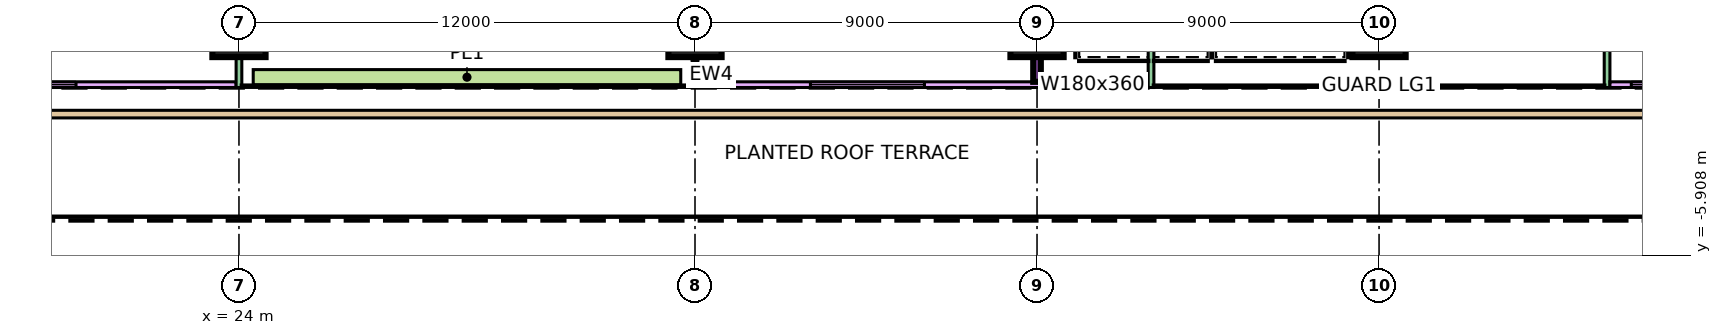
"""IFC4 building model, lengths in metres.
Left out: names, types, materials, properties, quantities, classifications, styles, units other than length and angle.
Written with IfcOpenShell. Run it as: python <this file> out.ifc"""

import sys

from ifc_helpers import new_model, si_unit, direction, frame, frame_2d, origin, origin_2d, place, context, subcontext, project, spatial, rectangle, extrude, element, fill, save


model = new_model("IFC4")
c1 = context("Model", 3, precision=1e-05, world=origin(), true_north=direction((0.0, 1.0)))
c2 = subcontext(c1, "Body", "Model", "MODEL_VIEW")
j1 = project(units=[si_unit("LENGTHUNIT", "METRE"), si_unit("PLANEANGLEUNIT", "RADIAN")], contexts=[c1])
p1 = place(None, origin())
s1 = spatial("IfcSite", under=j1, at=p1, CompositionType="ELEMENT")
p2 = place(p1, origin())
s2 = spatial("IfcBuilding", under=s1, at=p2, CompositionType="ELEMENT")
p3 = place(p2, frame((0.0, 0.0, 35.4)))
s3 = spatial("IfcBuildingStorey", under=s2, at=p3, CompositionType="ELEMENT", Elevation=35.4)
for number, where, z_axis, x_axis in (
    (1, (24.0, 0.0, 0.0), (0.0, 0.0, 1.0), (1.0, 0.0, 0.0)),
    (2, (36.0, 0.0, 0.0), (0.0, 0.0, 1.0), (1.0, 0.0, 0.0)),
    (3, (45.0, 0.0, 0.0), (0.0, 0.0, 1.0), (1.0, 0.0, 0.0)),
    (4, (54.0, 0.0, 0.0), (0.0, 0.0, 1.0), (1.0, 0.0, 0.0)),
):
    element("IfcColumn", number, at=place(p3, frame(where, z_axis=z_axis, x_axis=x_axis)), inside=s3, PredefinedType="COLUMN", context=c2, shape_type="SweptSolid", body=[
        extrude(rectangle(XDim=1.4, YDim=1.4, at=origin_2d()), origin(), (0.0, 0.0, 1.0), 6.0),
    ])
p4 = place(p3, frame((12.5, -1.425, 0.0), z_axis=(0.0, 0.0, 1.0), x_axis=(1.0, 0.0, 0.0)))
e5 = element("IfcWall", 5, at=p4, inside=s3, PredefinedType="SOLIDWALL", context=c2, shape_type="SweptSolid", body=[
    extrude(rectangle(XDim=11.425, YDim=0.15, at=frame_2d((5.712, 0.0))), origin(), (0.0, 0.0, 1.0), 5.6),
])
p5 = place(p4, frame((4.212, 0.0, 0.45)))
e6 = element("IfcOpeningElement", 6, at=p5, cuts=e5, PredefinedType="OPENING", context=c2, shape_type="SweptSolid", body=[
    extrude(rectangle(XDim=3.0, YDim=3.6, at=frame_2d((1.5, 1.8))), frame((0.0, 0.085, 0.0), z_axis=(0.0, -1.0, 0.0), x_axis=(1.0, 0.0, 0.0)), (0.0, 0.0, 1.0), 0.17),
])
for number, where, z_axis, x_axis in (
    (7, (24.0, -1.5, 0.0), (0.0, 0.0, 1.0), (0.0, 1.0, 0.0)),
    (8, (36.0, -1.5, 0.0), (0.0, 0.0, 1.0), (0.0, 1.0, 0.0)),
):
    element("IfcWall", number, at=place(p3, frame(where, z_axis=z_axis, x_axis=x_axis)), inside=s3, PredefinedType="SOLIDWALL", context=c2, shape_type="SweptSolid", body=[
        extrude(rectangle(XDim=1.5, YDim=0.15, at=frame_2d((0.75, 0.0))), origin(), (0.0, 0.0, 1.0), 5.6),
    ])
p6 = place(p3, frame((36.075, -1.425, 0.0), z_axis=(0.0, 0.0, 1.0), x_axis=(1.0, 0.0, 0.0)))
e9 = element("IfcWall", 9, at=p6, inside=s3, PredefinedType="SOLIDWALL", context=c2, shape_type="SweptSolid", body=[
    extrude(rectangle(XDim=11.85, YDim=0.15, at=frame_2d((5.925, 0.0))), origin(), (0.0, 0.0, 1.0), 5.6),
])
p7 = place(p6, frame((2.962, 0.0, 0.45)))
e10 = element("IfcOpeningElement", 10, at=p7, cuts=e9, PredefinedType="OPENING", context=c2, shape_type="SweptSolid", body=[
    extrude(rectangle(XDim=3.0, YDim=3.6, at=frame_2d((1.5, 1.8))), frame((0.0, 0.085, 0.0), z_axis=(0.0, -1.0, 0.0), x_axis=(1.0, 0.0, 0.0)), (0.0, 0.0, 1.0), 0.17),
])
p8 = place(p6, frame((9.488, 0.0, 0.45)))
e11 = element("IfcOpeningElement", 11, at=p8, cuts=e9, PredefinedType="OPENING", context=c2, shape_type="SweptSolid", body=[
    extrude(rectangle(XDim=1.8, YDim=3.6, at=frame_2d((0.9, 1.8))), frame((0.0, 0.085, 0.0), z_axis=(0.0, -1.0, 0.0), x_axis=(1.0, 0.0, 0.0)), (0.0, 0.0, 1.0), 0.17),
])
for number, where, z_axis, x_axis in (
    (12, (48.0, -1.5, 0.0), (0.0, 0.0, 1.0), (0.0, 1.0, 0.0)),
    (13, (60.0, -1.5, 0.0), (0.0, 0.0, 1.0), (0.0, 1.0, 0.0)),
):
    element("IfcWall", number, at=place(p3, frame(where, z_axis=z_axis, x_axis=x_axis)), inside=s3, PredefinedType="SOLIDWALL", context=c2, shape_type="SweptSolid", body=[
        extrude(rectangle(XDim=1.5, YDim=0.15, at=frame_2d((0.75, 0.0))), origin(), (0.0, 0.0, 1.0), 5.6),
    ])
p9 = place(p3, frame((60.075, -1.425, 0.0), z_axis=(0.0, 0.0, 1.0), x_axis=(1.0, 0.0, 0.0)))
e14 = element("IfcWall", 14, at=p9, inside=s3, PredefinedType="SOLIDWALL", context=c2, shape_type="SweptSolid", body=[
    extrude(rectangle(XDim=10.425, YDim=0.15, at=frame_2d((5.212, 0.0))), origin(), (0.0, 0.0, 1.0), 5.6),
])
p10 = place(p9, frame((0.562, 0.0, 0.45)))
e15 = element("IfcOpeningElement", 15, at=p10, cuts=e14, PredefinedType="OPENING", context=c2, shape_type="SweptSolid", body=[
    extrude(rectangle(XDim=1.8, YDim=3.6, at=frame_2d((0.9, 1.8))), frame((0.0, 0.085, 0.0), z_axis=(0.0, -1.0, 0.0), x_axis=(1.0, 0.0, 0.0)), (0.0, 0.0, 1.0), 0.17),
])
p11 = place(p9, frame((5.175, 0.0, 0.45)))
e16 = element("IfcOpeningElement", 16, at=p11, cuts=e14, PredefinedType="OPENING", context=c2, shape_type="SweptSolid", body=[
    extrude(rectangle(XDim=3.0, YDim=3.6, at=frame_2d((1.5, 1.8))), frame((0.0, 0.085, 0.0), z_axis=(0.0, -1.0, 0.0), x_axis=(1.0, 0.0, 0.0)), (0.0, 0.0, 1.0), 0.17),
])
p12 = place(p3, frame((24.375, -1.229, 0.0), z_axis=(0.0, 0.0, 1.0), x_axis=(1.0, 0.0, 0.0)))
e17 = element("IfcWall", 17, at=p12, inside=s3, PredefinedType="SOLIDWALL", context=c2, shape_type="SweptSolid", body=[
    extrude(rectangle(XDim=11.25, YDim=0.4, at=frame_2d((5.625, 0.0))), origin(), (0.0, 0.0, 1.0), 0.7),
])
p13 = place(p3, frame((70.79, -2.2, 0.0), z_axis=(0.0, 0.0, 1.0), x_axis=(-1.0, 0.0, 0.0)))
e18 = element("IfcWall", 18, at=p13, inside=s3, PredefinedType="PARAPET", context=c2, shape_type="SweptSolid", body=[
    extrude(rectangle(XDim=58.58, YDim=0.2, at=frame_2d((29.29, 0.0))), origin(), (0.0, 0.0, 1.0), 0.5),
])
p14 = place(p3, frame((45.0, -1.351, 0.0), z_axis=(0.0, 0.0, 1.0), x_axis=(0.0, 1.0, 0.0)))
e19 = element("IfcWall", 19, at=p14, inside=s3, PredefinedType="SOLIDWALL", context=c2, shape_type="SweptSolid", body=[
    extrude(rectangle(XDim=13.851, YDim=0.2, at=frame_2d((6.926, 0.0))), origin(), (0.0, 0.0, 1.0), 5.6),
])
p15 = place(p5, origin())
e20 = element("IfcWindow", 20, at=p15, inside=s3, PartitioningType="SINGLE_PANEL", PredefinedType="WINDOW", context=c2, shape_type="SweptSolid", body=[
    extrude(rectangle(XDim=3.0, YDim=3.6, at=frame_2d((1.5, 1.8))), frame((0.0, 0.03, 0.0), z_axis=(0.0, -1.0, 0.0), x_axis=(1.0, 0.0, 0.0)), (0.0, 0.0, 1.0), 0.06),
])
fill(e6, e20)
p16 = place(p7, origin())
e21 = element("IfcWindow", 21, at=p16, inside=s3, PartitioningType="SINGLE_PANEL", PredefinedType="WINDOW", context=c2, shape_type="SweptSolid", body=[
    extrude(rectangle(XDim=3.0, YDim=3.6, at=frame_2d((1.5, 1.8))), frame((0.0, 0.03, 0.0), z_axis=(0.0, -1.0, 0.0), x_axis=(1.0, 0.0, 0.0)), (0.0, 0.0, 1.0), 0.06),
])
fill(e10, e21)
p17 = place(p8, origin())
e22 = element("IfcWindow", 22, at=p17, inside=s3, PartitioningType="SINGLE_PANEL", PredefinedType="WINDOW", context=c2, shape_type="SweptSolid", body=[
    extrude(rectangle(XDim=1.8, YDim=3.6, at=frame_2d((0.9, 1.8))), frame((0.0, 0.03, 0.0), z_axis=(0.0, -1.0, 0.0), x_axis=(1.0, 0.0, 0.0)), (0.0, 0.0, 1.0), 0.06),
])
fill(e11, e22)
p18 = place(p10, origin())
e23 = element("IfcWindow", 23, at=p18, inside=s3, PartitioningType="SINGLE_PANEL", PredefinedType="WINDOW", context=c2, shape_type="SweptSolid", body=[
    extrude(rectangle(XDim=1.8, YDim=3.6, at=frame_2d((0.9, 1.8))), frame((0.0, 0.03, 0.0), z_axis=(0.0, -1.0, 0.0), x_axis=(1.0, 0.0, 0.0)), (0.0, 0.0, 1.0), 0.06),
])
fill(e15, e23)
save(model, sys.argv[1])
